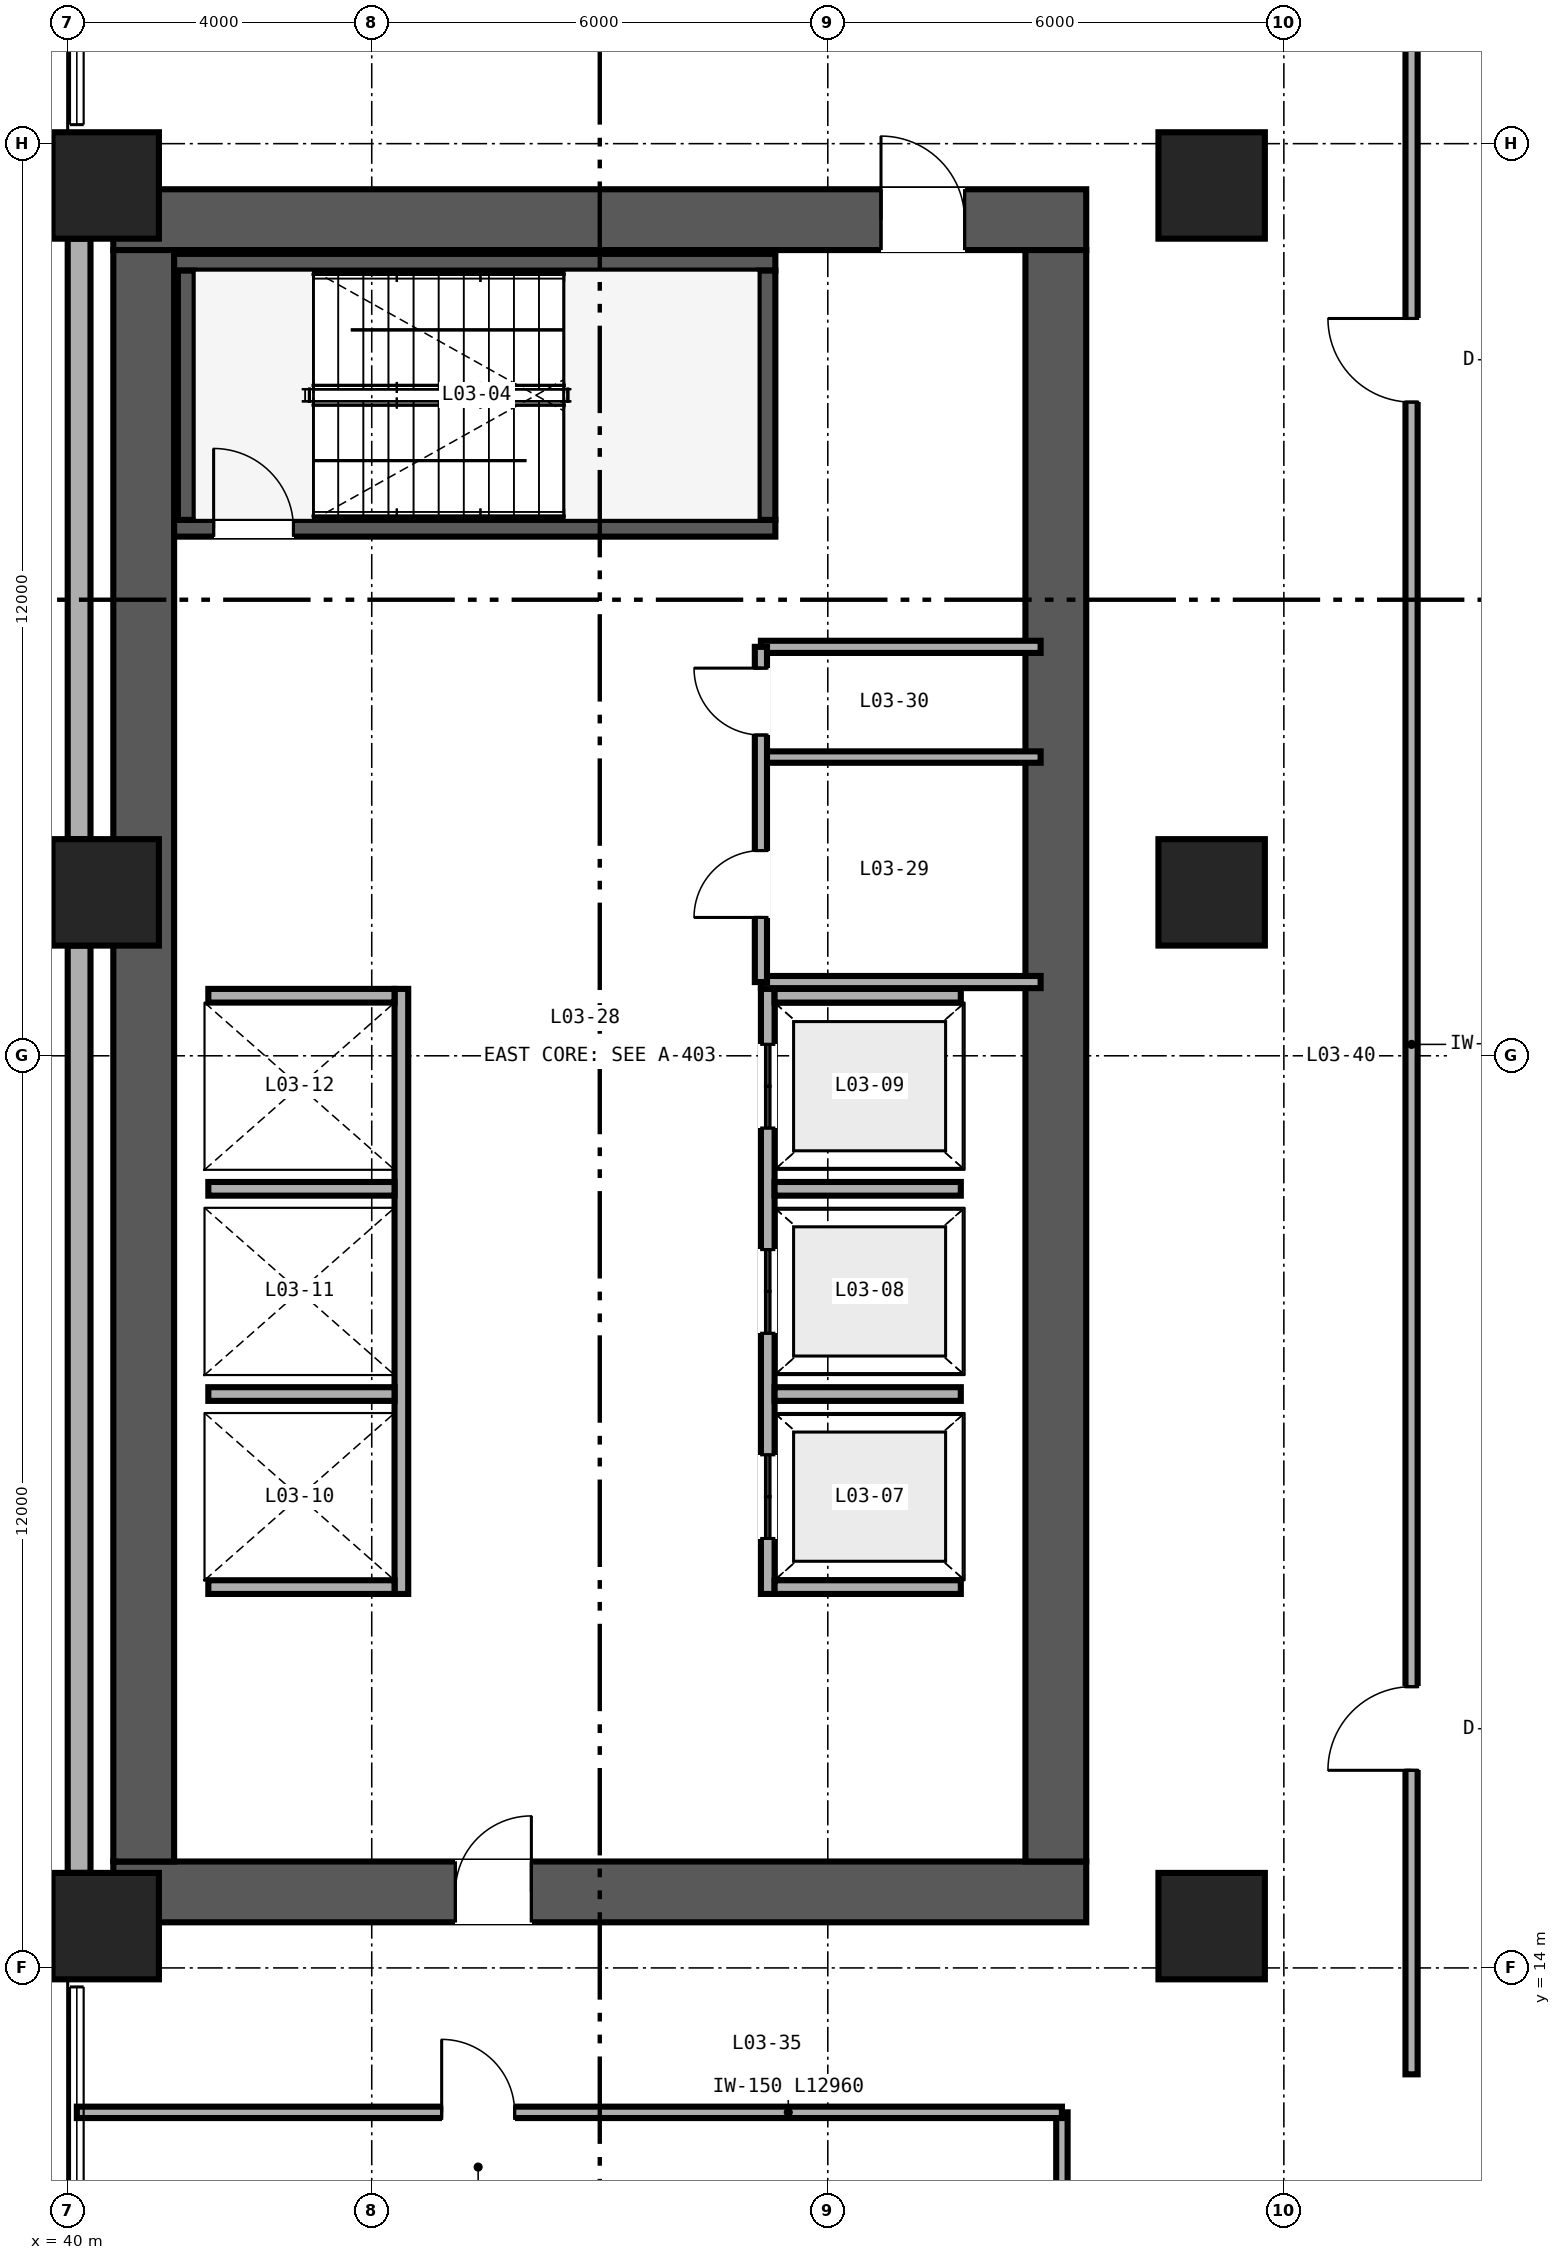
"""IFC4 building model, lengths in metres.
Left out: names, types, materials, properties, quantities, classifications, styles, units other than length and angle.
Written with IfcOpenShell. Run it as: python <this file> out.ifc"""

import sys

from ifc_helpers import new_model, si_unit, direction, frame, frame_2d, origin, origin_2d, place, context, subcontext, project, spatial, rectangle, extrude, source, transform, mapped, element, fill, save


model = new_model("IFC4")
c1 = context("Model", 3, precision=1e-05, world=origin(), true_north=direction((0.0, 1.0)))
c2 = subcontext(c1, "Body", "Model", "MODEL_VIEW")
j1 = project(units=[si_unit("LENGTHUNIT", "METRE"), si_unit("PLANEANGLEUNIT", "RADIAN")], contexts=[c1])
p1 = place(None, origin())
s1 = spatial("IfcSite", under=j1, at=p1, CompositionType="ELEMENT")
p2 = place(p1, origin())
s2 = spatial("IfcBuilding", under=s1, at=p2, CompositionType="ELEMENT")
p3 = place(p2, frame((0.0, 0.0, 11.4)))
s3 = spatial("IfcBuildingStorey", under=s2, at=p3, CompositionType="ELEMENT", Elevation=11.4)
p4 = place(p3, frame((40.6, 15.0, 0.0), z_axis=(0.0, 0.0, 1.0), x_axis=(1.0, 0.0, 0.0)))
e1 = element("IfcWall", 1, at=p4, inside=s3, PredefinedType="SHEAR", context=c2, shape_type="SweptSolid", body=[
    extrude(rectangle(XDim=12.8, YDim=0.8, at=frame_2d((6.4, 0.0))), origin(), (0.0, 0.0, 1.0), 7.51),
])
p5 = place(p4, frame((4.5, 0.0, 0.0)))
e2 = element("IfcOpeningElement", 2, at=p5, cuts=e1, PredefinedType="OPENING", context=c2, shape_type="SweptSolid", body=[
    extrude(rectangle(XDim=1.0, YDim=2.15, at=frame_2d((0.5, 1.075))), frame((0.0, 0.41, 0.0), z_axis=(0.0, -1.0, 0.0), x_axis=(1.0, 0.0, 0.0)), (0.0, 0.0, 1.0), 0.82),
])
p6 = place(p3, frame((40.6, 37.0, 0.0), z_axis=(0.0, 0.0, 1.0), x_axis=(1.0, 0.0, 0.0)))
e3 = element("IfcWall", 3, at=p6, inside=s3, PredefinedType="SHEAR", context=c2, shape_type="SweptSolid", body=[
    extrude(rectangle(XDim=12.8, YDim=0.8, at=frame_2d((6.4, 0.0))), origin(), (0.0, 0.0, 1.0), 7.51),
])
p7 = place(p6, frame((10.1, 0.0, 0.0)))
e4 = element("IfcOpeningElement", 4, at=p7, cuts=e3, PredefinedType="OPENING", context=c2, shape_type="SweptSolid", body=[
    extrude(rectangle(XDim=1.1, YDim=2.15, at=frame_2d((0.55, 1.075))), frame((0.0, 0.41, 0.0), z_axis=(0.0, -1.0, 0.0), x_axis=(1.0, 0.0, 0.0)), (0.0, 0.0, 1.0), 0.82),
])
for number, where, z_axis, x_axis in (
    (5, (41.0, 15.4, 0.0), (0.0, 0.0, 1.0), (0.0, 1.0, 0.0)),
    (6, (53.0, 15.4, 0.0), (0.0, 0.0, 1.0), (0.0, 1.0, 0.0)),
):
    element("IfcWall", number, at=place(p3, frame(where, z_axis=z_axis, x_axis=x_axis)), inside=s3, PredefinedType="SHEAR", context=c2, shape_type="SweptSolid", body=[
        extrude(rectangle(XDim=21.2, YDim=0.8, at=frame_2d((10.6, 0.0))), origin(), (0.0, 0.0, 1.0), 7.51),
    ])
p8 = place(p3, frame((41.4, 32.94, 0.0), z_axis=(0.0, 0.0, 1.0), x_axis=(1.0, 0.0, 0.0)))
e7 = element("IfcWall", 7, at=p8, inside=s3, PredefinedType="SHEAR", context=c2, shape_type="SweptSolid", body=[
    extrude(rectangle(XDim=7.91, YDim=0.22, at=frame_2d((3.955, 0.0))), origin(), (0.0, 0.0, 1.0), 7.6),
])
p9 = place(p8, frame((0.52, 0.0, 0.0)))
e8 = element("IfcOpeningElement", 8, at=p9, cuts=e7, PredefinedType="OPENING", context=c2, shape_type="SweptSolid", body=[
    extrude(rectangle(XDim=1.05, YDim=2.15, at=frame_2d((0.525, 1.075))), frame((0.0, 0.12, 0.0), z_axis=(0.0, -1.0, 0.0), x_axis=(1.0, 0.0, 0.0)), (0.0, 0.0, 1.0), 0.24),
])
p10 = place(p3, frame((41.4, 36.44, 0.0), z_axis=(0.0, 0.0, 1.0), x_axis=(1.0, 0.0, 0.0)))
e9 = element("IfcWall", 9, at=p10, inside=s3, PredefinedType="SHEAR", context=c2, shape_type="SweptSolid", body=[
    extrude(rectangle(XDim=7.91, YDim=0.22, at=frame_2d((3.955, 0.0))), origin(), (0.0, 0.0, 1.0), 7.6),
])
for number, where, z_axis, x_axis in (
    (10, (41.56, 33.05, 0.0), (0.0, 0.0, 1.0), (0.0, 1.0, 0.0)),
    (11, (49.2, 33.05, 0.0), (0.0, 0.0, 1.0), (0.0, 1.0, 0.0)),
):
    element("IfcWall", number, at=place(p3, frame(where, z_axis=z_axis, x_axis=x_axis)), inside=s3, PredefinedType="SHEAR", context=c2, shape_type="SweptSolid", body=[
        extrude(rectangle(XDim=3.28, YDim=0.22, at=frame_2d((1.64, 0.0))), origin(), (0.0, 0.0, 1.0), 7.6),
    ])
m1 = source(origin(), c2, "Body", "SweptSolid", [
    extrude(rectangle(XDim=1.4, YDim=1.4, at=origin_2d()), origin(), (0.0, 0.0, 1.0), 7.51),
])
for number, where, z_axis, x_axis in (
    (12, (40.5, 14.55, 0.0), (0.0, 0.0, 1.0), (1.0, 0.0, 0.0)),
    (13, (55.05, 14.55, 0.0), (0.0, 0.0, 1.0), (1.0, 0.0, 0.0)),
    (14, (40.5, 28.15, 0.0), (0.0, 0.0, 1.0), (1.0, 0.0, 0.0)),
    (15, (55.05, 28.15, 0.0), (0.0, 0.0, 1.0), (1.0, 0.0, 0.0)),
    (16, (40.5, 37.45, 0.0), (0.0, 0.0, 1.0), (1.0, 0.0, 0.0)),
    (17, (55.05, 37.45, 0.0), (0.0, 0.0, 1.0), (1.0, 0.0, 0.0)),
):
    element("IfcColumn", number, at=place(p3, frame(where, z_axis=z_axis, x_axis=x_axis)), inside=s3, PredefinedType="COLUMN", context=c2, shape_type="MappedRepresentation", body=[
        mapped(m1, transform((0.0, 0.0, 0.0), scale=1.0)),
    ])
p11 = place(p3, frame((40.15, 15.25, 0.0), z_axis=(0.0, 0.0, 1.0), x_axis=(0.0, 1.0, 0.0)))
e18 = element("IfcWall", 18, at=p11, inside=s3, PredefinedType="SOLIDWALL", context=c2, shape_type="SweptSolid", body=[
    extrude(rectangle(XDim=12.2, YDim=0.3, at=frame_2d((6.1, 0.0))), origin(), (0.0, 0.0, 1.0), 6.731),
])
p12 = place(p3, frame((40.15, 28.85, 0.0), z_axis=(0.0, 0.0, 1.0), x_axis=(0.0, 1.0, 0.0)))
e19 = element("IfcWall", 19, at=p12, inside=s3, PredefinedType="SOLIDWALL", context=c2, shape_type="SweptSolid", body=[
    extrude(rectangle(XDim=7.9, YDim=0.3, at=frame_2d((3.95, 0.0))), origin(), (0.0, 0.0, 1.0), 7.053),
])
p13 = place(p3, frame((49.21, 18.92, 0.0), z_axis=(0.0, 0.0, 1.0), x_axis=(0.0, 1.0, 0.0)))
e20 = element("IfcWall", 20, at=p13, inside=s3, PredefinedType="SOLIDWALL", context=c2, shape_type="SweptSolid", body=[
    extrude(rectangle(XDim=7.96, YDim=0.18, at=frame_2d((3.98, 0.0))), origin(), (0.0, 0.0, 1.0), 7.51),
])
p14 = place(p13, frame((0.73, 0.0, 0.0)))
e21 = element("IfcOpeningElement", 21, at=p14, cuts=e20, PredefinedType="OPENING", context=c2, shape_type="SweptSolid", body=[
    extrude(rectangle(XDim=1.1, YDim=2.2, at=frame_2d((0.55, 1.1))), frame((0.0, 0.1, 0.0), z_axis=(0.0, -1.0, 0.0), x_axis=(1.0, 0.0, 0.0)), (0.0, 0.0, 1.0), 0.2),
])
p15 = place(p13, frame((3.43, 0.0, 0.0)))
e22 = element("IfcOpeningElement", 22, at=p15, cuts=e20, PredefinedType="OPENING", context=c2, shape_type="SweptSolid", body=[
    extrude(rectangle(XDim=1.1, YDim=2.2, at=frame_2d((0.55, 1.1))), frame((0.0, 0.1, 0.0), z_axis=(0.0, -1.0, 0.0), x_axis=(1.0, 0.0, 0.0)), (0.0, 0.0, 1.0), 0.2),
])
p16 = place(p13, frame((6.13, 0.0, 0.0)))
e23 = element("IfcOpeningElement", 23, at=p16, cuts=e20, PredefinedType="OPENING", context=c2, shape_type="SweptSolid", body=[
    extrude(rectangle(XDim=1.1, YDim=2.2, at=frame_2d((0.55, 1.1))), frame((0.0, 0.1, 0.0), z_axis=(0.0, -1.0, 0.0), x_axis=(1.0, 0.0, 0.0)), (0.0, 0.0, 1.0), 0.2),
])
for number, where, z_axis, x_axis in (
    (24, (49.3, 19.01, 0.0), (0.0, 0.0, 1.0), (1.0, 0.0, 0.0)),
    (25, (49.3, 26.79, 0.0), (0.0, 0.0, 1.0), (1.0, 0.0, 0.0)),
    (26, (49.3, 21.55, 0.0), (0.0, 0.0, 1.0), (1.0, 0.0, 0.0)),
    (27, (49.3, 24.25, 0.0), (0.0, 0.0, 1.0), (1.0, 0.0, 0.0)),
):
    element("IfcWall", number, at=place(p3, frame(where, z_axis=z_axis, x_axis=x_axis)), inside=s3, PredefinedType="SOLIDWALL", context=c2, shape_type="SweptSolid", body=[
        extrude(rectangle(XDim=2.45, YDim=0.18, at=frame_2d((1.225, 0.0))), origin(), (0.0, 0.0, 1.0), 7.51),
    ])
p17 = place(p3, frame((44.39, 18.92, 0.0), z_axis=(0.0, 0.0, 1.0), x_axis=(0.0, 1.0, 0.0)))
e28 = element("IfcWall", 28, at=p17, inside=s3, PredefinedType="SOLIDWALL", context=c2, shape_type="SweptSolid", body=[
    extrude(rectangle(XDim=7.96, YDim=0.18, at=frame_2d((3.98, 0.0))), origin(), (0.0, 0.0, 1.0), 7.51),
])
for number, where, z_axis, x_axis in (
    (29, (41.85, 19.01, 0.0), (0.0, 0.0, 1.0), (1.0, 0.0, 0.0)),
    (30, (41.85, 26.79, 0.0), (0.0, 0.0, 1.0), (1.0, 0.0, 0.0)),
    (31, (41.85, 21.55, 0.0), (0.0, 0.0, 1.0), (1.0, 0.0, 0.0)),
    (32, (41.85, 24.25, 0.0), (0.0, 0.0, 1.0), (1.0, 0.0, 0.0)),
):
    element("IfcWall", number, at=place(p3, frame(where, z_axis=z_axis, x_axis=x_axis)), inside=s3, PredefinedType="SOLIDWALL", context=c2, shape_type="SweptSolid", body=[
        extrude(rectangle(XDim=2.45, YDim=0.18, at=frame_2d((1.225, 0.0))), origin(), (0.0, 0.0, 1.0), 7.51),
    ])
p18 = place(p3, frame((49.12, 26.97, 0.0), z_axis=(0.0, 0.0, 1.0), x_axis=(1.0, 0.0, 0.0)))
e33 = element("IfcWall", 33, at=p18, inside=s3, PredefinedType="PARTITIONING", context=c2, shape_type="SweptSolid", body=[
    extrude(rectangle(XDim=3.68, YDim=0.16, at=frame_2d((1.84, 0.0))), origin(), (0.0, 0.0, 1.0), 7.51),
])
p19 = place(p3, frame((49.12, 31.38, 0.0), z_axis=(0.0, 0.0, 1.0), x_axis=(1.0, 0.0, 0.0)))
e34 = element("IfcWall", 34, at=p19, inside=s3, PredefinedType="PARTITIONING", context=c2, shape_type="SweptSolid", body=[
    extrude(rectangle(XDim=3.68, YDim=0.16, at=frame_2d((1.84, 0.0))), origin(), (0.0, 0.0, 1.0), 6.41),
])
p20 = place(p3, frame((49.12, 29.93, 0.0), z_axis=(0.0, 0.0, 1.0), x_axis=(1.0, 0.0, 0.0)))
e35 = element("IfcWall", 35, at=p20, inside=s3, PredefinedType="PARTITIONING", context=c2, shape_type="SweptSolid", body=[
    extrude(rectangle(XDim=3.68, YDim=0.15, at=frame_2d((1.84, 0.0))), origin(), (0.0, 0.0, 1.0), 7.51),
])
p21 = place(p3, frame((49.12, 26.97, 0.0), z_axis=(0.0, 0.0, 1.0), x_axis=(0.0, 1.0, 0.0)))
e36 = element("IfcWall", 36, at=p21, inside=s3, PredefinedType="PARTITIONING", context=c2, shape_type="SweptSolid", body=[
    extrude(rectangle(XDim=4.41, YDim=0.16, at=frame_2d((2.205, 0.0))), origin(), (0.0, 0.0, 1.0), 6.41),
])
p22 = place(p21, frame((0.85, 0.0, 0.0)))
e37 = element("IfcOpeningElement", 37, at=p22, cuts=e36, PredefinedType="OPENING", context=c2, shape_type="SweptSolid", body=[
    extrude(rectangle(XDim=0.88, YDim=2.15, at=frame_2d((0.44, 1.075))), frame((0.0, 0.09, 0.0), z_axis=(0.0, -1.0, 0.0), x_axis=(1.0, 0.0, 0.0)), (0.0, 0.0, 1.0), 0.18),
])
p23 = place(p21, frame((3.25, 0.0, 0.0)))
e38 = element("IfcOpeningElement", 38, at=p23, cuts=e36, PredefinedType="OPENING", context=c2, shape_type="SweptSolid", body=[
    extrude(rectangle(XDim=0.88, YDim=2.15, at=frame_2d((0.44, 1.075))), frame((0.0, 0.09, 0.0), z_axis=(0.0, -1.0, 0.0), x_axis=(1.0, 0.0, 0.0)), (0.0, 0.0, 1.0), 0.18),
])
p24 = place(p3, frame((57.68, 12.6, 0.0), z_axis=(0.0, 0.0, 1.0), x_axis=(0.0, 1.0, 0.0)))
e39 = element("IfcWall", 39, at=p24, inside=s3, PredefinedType="PARTITIONING", context=c2, shape_type="SweptSolid", body=[
    extrude(rectangle(XDim=31.2, YDim=0.16, at=frame_2d((15.6, 0.0))), origin(), (0.0, 0.0, 1.0), 7.51),
])
p25 = place(p24, frame((4.0, 0.0, 0.0)))
e40 = element("IfcOpeningElement", 40, at=p25, cuts=e39, PredefinedType="OPENING", context=c2, shape_type="SweptSolid", body=[
    extrude(rectangle(XDim=1.1, YDim=2.15, at=frame_2d((0.55, 1.075))), frame((0.0, 0.09, 0.0), z_axis=(0.0, -1.0, 0.0), x_axis=(1.0, 0.0, 0.0)), (0.0, 0.0, 1.0), 0.18),
])
p26 = place(p24, frame((22.0, 0.0, 0.0)))
e41 = element("IfcOpeningElement", 41, at=p26, cuts=e39, PredefinedType="OPENING", context=c2, shape_type="SweptSolid", body=[
    extrude(rectangle(XDim=1.1, YDim=2.15, at=frame_2d((0.55, 1.075))), frame((0.0, 0.09, 0.0), z_axis=(0.0, -1.0, 0.0), x_axis=(1.0, 0.0, 0.0)), (0.0, 0.0, 1.0), 0.18),
])
p27 = place(p3, frame((53.08, 0.35, 0.0), z_axis=(0.0, 0.0, 1.0), x_axis=(0.0, 1.0, 0.0)))
e42 = element("IfcWall", 42, at=p27, inside=s3, PredefinedType="PARTITIONING", context=c2, shape_type="SweptSolid", body=[
    extrude(rectangle(XDim=11.75, YDim=0.15, at=frame_2d((5.875, 0.0))), origin(), (0.0, 0.0, 1.0), 6.583),
])
p28 = place(p3, frame((40.12, 12.1, 0.0), z_axis=(0.0, 0.0, 1.0), x_axis=(1.0, 0.0, 0.0)))
e43 = element("IfcWall", 43, at=p28, inside=s3, PredefinedType="PARTITIONING", context=c2, shape_type="SweptSolid", body=[
    extrude(rectangle(XDim=12.96, YDim=0.15, at=frame_2d((6.48, 0.0))), origin(), (0.0, 0.0, 1.0), 6.731),
])
p29 = place(p28, frame((4.8, 0.0, 0.0)))
e44 = element("IfcOpeningElement", 44, at=p29, cuts=e43, PredefinedType="OPENING", context=c2, shape_type="SweptSolid", body=[
    extrude(rectangle(XDim=0.96, YDim=2.15, at=frame_2d((0.48, 1.075))), frame((0.0, 0.085, 0.0), z_axis=(0.0, -1.0, 0.0), x_axis=(1.0, 0.0, 0.0)), (0.0, 0.0, 1.0), 0.17),
])
m2 = source(origin(), c2, "Body", "SweptSolid", [
    extrude(rectangle(XDim=1.05, YDim=2.15, at=frame_2d((0.525, 1.075))), frame((0.0, 0.025, 0.0), z_axis=(0.0, -1.0, 0.0), x_axis=(1.0, 0.0, 0.0)), (0.0, 0.0, 1.0), 0.05),
])
p30 = place(p9, origin())
e45 = element("IfcDoor", 45, at=p30, inside=s3, OperationType="SINGLE_SWING_LEFT", PredefinedType="DOOR", context=c2, shape_type="MappedRepresentation", body=[
    mapped(m2, transform((0.0, 0.0, 0.0), scale=1.0)),
])
fill(e8, e45)
m3 = source(origin(), c2, "Body", "SweptSolid", [
    extrude(rectangle(XDim=1.1, YDim=2.2, at=frame_2d((0.55, 1.1))), frame((0.0, 0.025, 0.0), z_axis=(0.0, -1.0, 0.0), x_axis=(1.0, 0.0, 0.0)), (0.0, 0.0, 1.0), 0.05),
])
p31 = place(p14, origin())
e46 = element("IfcDoor", 46, at=p31, inside=s3, OperationType="DOUBLE_DOOR_SLIDING", PredefinedType="DOOR", context=c2, shape_type="MappedRepresentation", body=[
    mapped(m3, transform((0.0, 0.0, 0.0), scale=1.0)),
])
fill(e21, e46)
p32 = place(p15, origin())
e47 = element("IfcDoor", 47, at=p32, inside=s3, OperationType="DOUBLE_DOOR_SLIDING", PredefinedType="DOOR", context=c2, shape_type="MappedRepresentation", body=[
    mapped(m3, transform((0.0, 0.0, 0.0), scale=1.0)),
])
fill(e22, e47)
p33 = place(p16, origin())
e48 = element("IfcDoor", 48, at=p33, inside=s3, OperationType="DOUBLE_DOOR_SLIDING", PredefinedType="DOOR", context=c2, shape_type="MappedRepresentation", body=[
    mapped(m3, transform((0.0, 0.0, 0.0), scale=1.0)),
])
fill(e23, e48)
m4 = source(origin(), c2, "Body", "SweptSolid", [
    extrude(rectangle(XDim=1.0, YDim=2.15, at=frame_2d((0.5, 1.075))), frame((0.0, 0.025, 0.0), z_axis=(0.0, -1.0, 0.0), x_axis=(1.0, 0.0, 0.0)), (0.0, 0.0, 1.0), 0.05),
])
p34 = place(p5, origin())
e49 = element("IfcDoor", 49, at=p34, inside=s3, OperationType="SINGLE_SWING_RIGHT", PredefinedType="DOOR", context=c2, shape_type="MappedRepresentation", body=[
    mapped(m4, transform((0.0, 0.0, 0.0), scale=1.0)),
])
fill(e2, e49)
m5 = source(origin(), c2, "Body", "SweptSolid", [
    extrude(rectangle(XDim=1.1, YDim=2.15, at=frame_2d((0.55, 1.075))), frame((0.0, 0.025, 0.0), z_axis=(0.0, -1.0, 0.0), x_axis=(1.0, 0.0, 0.0)), (0.0, 0.0, 1.0), 0.05),
])
p35 = place(p7, origin())
e50 = element("IfcDoor", 50, at=p35, inside=s3, OperationType="SINGLE_SWING_LEFT", PredefinedType="DOOR", context=c2, shape_type="MappedRepresentation", body=[
    mapped(m5, transform((0.0, 0.0, 0.0), scale=1.0)),
])
fill(e4, e50)
m6 = source(origin(), c2, "Body", "SweptSolid", [
    extrude(rectangle(XDim=0.88, YDim=2.15, at=frame_2d((0.44, 1.075))), frame((0.0, 0.025, 0.0), z_axis=(0.0, -1.0, 0.0), x_axis=(1.0, 0.0, 0.0)), (0.0, 0.0, 1.0), 0.05),
])
p36 = place(p22, origin())
e51 = element("IfcDoor", 51, at=p36, inside=s3, OperationType="SINGLE_SWING_LEFT", PredefinedType="DOOR", context=c2, shape_type="MappedRepresentation", body=[
    mapped(m6, transform((0.0, 0.0, 0.0), scale=1.0)),
])
fill(e37, e51)
p37 = place(p23, origin())
e52 = element("IfcDoor", 52, at=p37, inside=s3, OperationType="SINGLE_SWING_RIGHT", PredefinedType="DOOR", context=c2, shape_type="MappedRepresentation", body=[
    mapped(m6, transform((0.0, 0.0, 0.0), scale=1.0)),
])
fill(e38, e52)
p38 = place(p25, origin())
e53 = element("IfcDoor", 53, at=p38, inside=s3, OperationType="SINGLE_SWING_LEFT", PredefinedType="DOOR", context=c2, shape_type="MappedRepresentation", body=[
    mapped(m5, transform((0.0, 0.0, 0.0), scale=1.0)),
])
fill(e40, e53)
p39 = place(p26, origin())
e54 = element("IfcDoor", 54, at=p39, inside=s3, OperationType="SINGLE_SWING_RIGHT", PredefinedType="DOOR", context=c2, shape_type="MappedRepresentation", body=[
    mapped(m5, transform((0.0, 0.0, 0.0), scale=1.0)),
])
fill(e41, e54)
m7 = source(origin(), c2, "Body", "SweptSolid", [
    extrude(rectangle(XDim=0.96, YDim=2.15, at=frame_2d((0.48, 1.075))), frame((0.0, 0.025, 0.0), z_axis=(0.0, -1.0, 0.0), x_axis=(1.0, 0.0, 0.0)), (0.0, 0.0, 1.0), 0.05),
])
p40 = place(p29, origin())
e55 = element("IfcDoor", 55, at=p40, inside=s3, OperationType="SINGLE_SWING_LEFT", PredefinedType="DOOR", context=c2, shape_type="MappedRepresentation", body=[
    mapped(m7, transform((0.0, 0.0, 0.0), scale=1.0)),
])
fill(e44, e55)
save(model, sys.argv[1])
